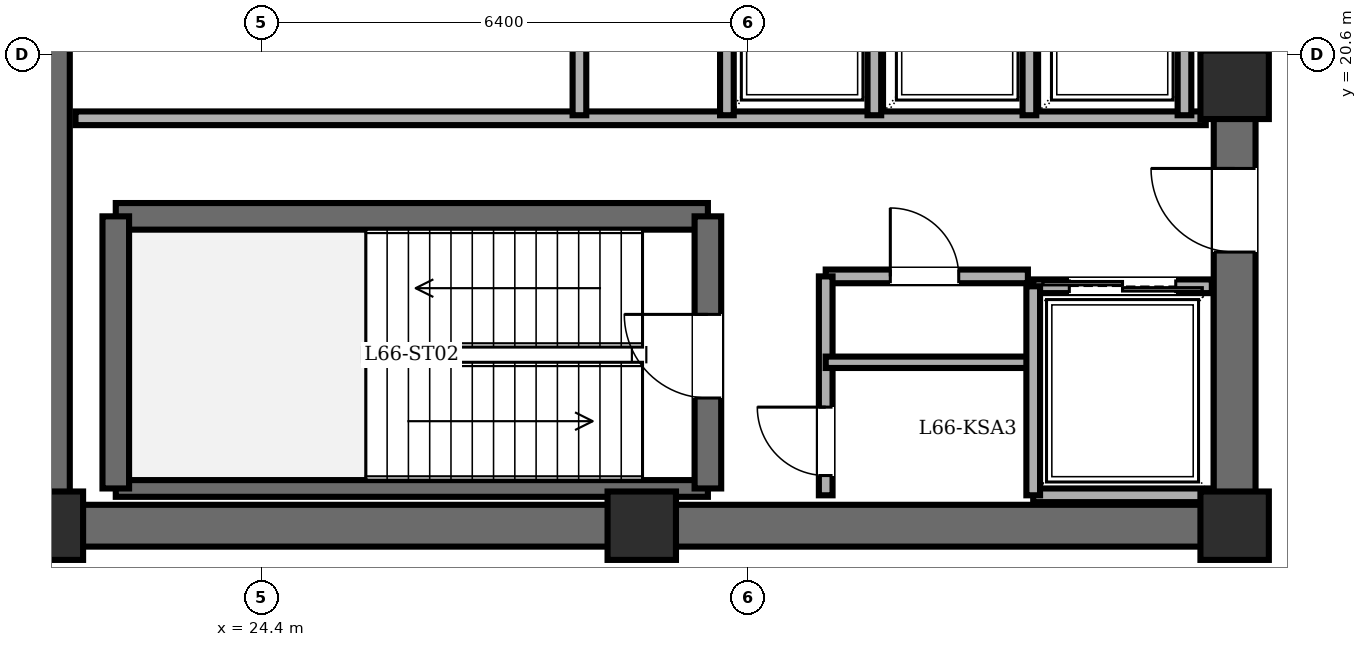
"""IFC4 building model, lengths in metres.
Left out: names, types, materials, properties, quantities, classifications, styles, units other than length and angle.
Written with IfcOpenShell. Run it as: python <this file> out.ifc"""

import sys

from ifc_helpers import new_model, si_unit, direction, frame, frame_2d, origin, origin_2d, place, context, subcontext, project, spatial, rectangle, extrude, element, fill, save


model = new_model("IFC4")
c1 = context("Model", 3, precision=1e-05, world=origin(), true_north=direction((0.0, 1.0)))
c2 = subcontext(c1, "Body", "Model", "MODEL_VIEW")
j1 = project(units=[si_unit("LENGTHUNIT", "METRE"), si_unit("PLANEANGLEUNIT", "RADIAN")], contexts=[c1])
p1 = place(None, origin())
s1 = spatial("IfcSite", under=j1, at=p1, CompositionType="ELEMENT")
p2 = place(p1, origin())
s2 = spatial("IfcBuilding", under=s1, at=p2, CompositionType="ELEMENT")
p3 = place(p2, frame((0.0, 0.0, 253.7)))
s3 = spatial("IfcBuildingStorey", under=s2, at=p3, CompositionType="ELEMENT", Elevation=253.7)
for number, where, z_axis, x_axis in (
    (1, (21.6, 14.4, 0.0), (0.0, 0.0, 1.0), (1.0, 0.0, 0.0)),
    (2, (29.4, 14.4, 0.0), (0.0, 0.0, 1.0), (1.0, 0.0, 0.0)),
    (3, (37.2, 14.4, 0.0), (0.0, 0.0, 1.0), (1.0, 0.0, 0.0)),
    (4, (37.2, 20.2, 0.0), (0.0, 0.0, 1.0), (1.0, 0.0, 0.0)),
):
    element("IfcColumn", number, at=place(p3, frame(where, z_axis=z_axis, x_axis=x_axis)), inside=s3, PredefinedType="COLUMN", context=c2, shape_type="SweptSolid", body=[
        extrude(rectangle(XDim=0.9, YDim=0.9, at=origin_2d()), origin(), (0.0, 0.0, 1.0), 5.1),
    ])
p4 = place(p3, frame((21.6, 14.4, 0.0), z_axis=(0.0, 0.0, 1.0), x_axis=(0.0, 1.0, 0.0)))
e5 = element("IfcWall", 5, at=p4, inside=s3, PredefinedType="SHEAR", context=c2, shape_type="SweptSolid", body=[
    extrude(rectangle(XDim=19.2, YDim=0.55, at=frame_2d((9.6, 0.0))), origin(), (0.0, 0.0, 1.0), 4.9),
])
p5 = place(p3, frame((37.2, 14.4, 0.0), z_axis=(0.0, 0.0, 1.0), x_axis=(-1.0, 0.0, 0.0)))
e6 = element("IfcWall", 6, at=p5, inside=s3, PredefinedType="SHEAR", context=c2, shape_type="SweptSolid", body=[
    extrude(rectangle(XDim=15.6, YDim=0.55, at=frame_2d((7.8, 0.0))), origin(), (0.0, 0.0, 1.0), 4.9),
])
p6 = place(p3, frame((37.2, 14.4, 0.0), z_axis=(0.0, 0.0, 1.0), x_axis=(0.0, 1.0, 0.0)))
e7 = element("IfcWall", 7, at=p6, inside=s3, PredefinedType="SHEAR", context=c2, shape_type="SweptSolid", body=[
    extrude(rectangle(XDim=19.2, YDim=0.55, at=frame_2d((9.6, 0.0))), origin(), (0.0, 0.0, 1.0), 4.9),
])
p7 = place(p6, frame((15.8, 0.0, 0.0)))
e8 = element("IfcOpeningElement", 8, at=p7, cuts=e7, PredefinedType="OPENING", context=c2, shape_type="SweptSolid", body=[
    extrude(rectangle(XDim=1.15, YDim=2.15, at=frame_2d((0.575, 1.075))), frame((0.0, 0.285, 0.0), z_axis=(0.0, -1.0, 0.0), x_axis=(1.0, 0.0, 0.0)), (0.0, 0.0, 1.0), 0.57),
])
p8 = place(p6, frame((3.6, 0.0, 0.0)))
e9 = element("IfcOpeningElement", 9, at=p8, cuts=e7, PredefinedType="OPENING", context=c2, shape_type="SweptSolid", body=[
    extrude(rectangle(XDim=1.1, YDim=2.15, at=frame_2d((0.55, 1.075))), frame((0.0, 0.285, 0.0), z_axis=(0.0, -1.0, 0.0), x_axis=(1.0, 0.0, 0.0)), (0.0, 0.0, 1.0), 0.57),
])
p9 = place(p6, frame((8.6, 0.0, 0.0)))
e10 = element("IfcOpeningElement", 10, at=p9, cuts=e7, PredefinedType="OPENING", context=c2, shape_type="SweptSolid", body=[
    extrude(rectangle(XDim=1.3, YDim=2.2, at=frame_2d((0.65, 1.1))), frame((0.0, 0.285, 0.0), z_axis=(0.0, -1.0, 0.0), x_axis=(1.0, 0.0, 0.0)), (0.0, 0.0, 1.0), 0.57),
])
p10 = place(p3, frame((22.48, 18.47, 0.0), z_axis=(0.0, 0.0, 1.0), x_axis=(1.0, 0.0, 0.0)))
e11 = element("IfcWall", 11, at=p10, inside=s3, PredefinedType="SOLIDWALL", context=c2, shape_type="SweptSolid", body=[
    extrude(rectangle(XDim=7.79, YDim=0.35, at=frame_2d((3.895, 0.0))), origin(), (0.0, 0.0, 1.0), 4.9),
])
p11 = place(p3, frame((22.48, 14.89, 0.0), z_axis=(0.0, 0.0, 1.0), x_axis=(1.0, 0.0, 0.0)))
e12 = element("IfcWall", 12, at=p11, inside=s3, PredefinedType="PARTITIONING", context=c2, shape_type="SweptSolid", body=[
    extrude(rectangle(XDim=7.79, YDim=0.22, at=frame_2d((3.895, 0.0))), origin(), (0.0, 0.0, 1.0), 4.9),
])
p12 = place(p3, frame((22.48, 14.89, 0.0), z_axis=(0.0, 0.0, 1.0), x_axis=(0.0, 1.0, 0.0)))
e13 = element("IfcWall", 13, at=p12, inside=s3, PredefinedType="SOLIDWALL", context=c2, shape_type="SweptSolid", body=[
    extrude(rectangle(XDim=3.58, YDim=0.35, at=frame_2d((1.79, 0.0))), origin(), (0.0, 0.0, 1.0), 4.9),
])
p13 = place(p3, frame((30.27, 14.89, 0.0), z_axis=(0.0, 0.0, 1.0), x_axis=(0.0, 1.0, 0.0)))
e14 = element("IfcWall", 14, at=p13, inside=s3, PredefinedType="SOLIDWALL", context=c2, shape_type="SweptSolid", body=[
    extrude(rectangle(XDim=3.58, YDim=0.35, at=frame_2d((1.79, 0.0))), origin(), (0.0, 0.0, 1.0), 4.9),
])
p14 = place(p13, frame((1.19, 0.0, 0.0)))
e15 = element("IfcOpeningElement", 15, at=p14, cuts=e14, PredefinedType="OPENING", context=c2, shape_type="SweptSolid", body=[
    extrude(rectangle(XDim=1.1, YDim=2.15, at=frame_2d((0.55, 1.075))), frame((0.0, 0.185, 0.0), z_axis=(0.0, -1.0, 0.0), x_axis=(1.0, 0.0, 0.0)), (0.0, 0.0, 1.0), 0.37),
])
p15 = place(p3, frame((21.95, 19.76, 0.0), z_axis=(0.0, 0.0, 1.0), x_axis=(1.0, 0.0, 0.0)))
e16 = element("IfcWall", 16, at=p15, inside=s3, PredefinedType="PARTITIONING", context=c2, shape_type="SweptSolid", body=[
    extrude(rectangle(XDim=14.87, YDim=0.18, at=frame_2d((7.435, 0.0))), origin(), (0.0, 0.0, 1.0), 4.9),
])
p16 = place(p3, frame((31.82, 17.68, 0.0), z_axis=(0.0, 0.0, 1.0), x_axis=(1.0, 0.0, 0.0)))
e17 = element("IfcWall", 17, at=p16, inside=s3, PredefinedType="PARTITIONING", context=c2, shape_type="SweptSolid", body=[
    extrude(rectangle(XDim=2.66, YDim=0.18, at=frame_2d((1.33, 0.0))), origin(), (0.0, 0.0, 1.0), 4.9),
])
p17 = place(p16, frame((0.85, 0.0, 0.0)))
e18 = element("IfcOpeningElement", 18, at=p17, cuts=e17, PredefinedType="OPENING", context=c2, shape_type="SweptSolid", body=[
    extrude(rectangle(XDim=0.9, YDim=2.05, at=frame_2d((0.45, 1.025))), frame((0.0, 0.1, 0.0), z_axis=(0.0, -1.0, 0.0), x_axis=(1.0, 0.0, 0.0)), (0.0, 0.0, 1.0), 0.2),
])
p18 = place(p3, frame((31.82, 14.8, 0.0), z_axis=(0.0, 0.0, 1.0), x_axis=(0.0, 1.0, 0.0)))
e19 = element("IfcWall", 19, at=p18, inside=s3, PredefinedType="PARTITIONING", context=c2, shape_type="SweptSolid", body=[
    extrude(rectangle(XDim=2.88, YDim=0.18, at=frame_2d((1.44, 0.0))), origin(), (0.0, 0.0, 1.0), 4.9),
])
p19 = place(p18, frame((0.26, 0.0, 0.0)))
e20 = element("IfcOpeningElement", 20, at=p19, cuts=e19, PredefinedType="OPENING", context=c2, shape_type="SweptSolid", body=[
    extrude(rectangle(XDim=0.9, YDim=2.05, at=frame_2d((0.45, 1.025))), frame((0.0, 0.1, 0.0), z_axis=(0.0, -1.0, 0.0), x_axis=(1.0, 0.0, 0.0)), (0.0, 0.0, 1.0), 0.2),
])
p20 = place(p3, frame((31.82, 16.55, 0.0), z_axis=(0.0, 0.0, 1.0), x_axis=(1.0, 0.0, 0.0)))
e21 = element("IfcWall", 21, at=p20, inside=s3, PredefinedType="PARTITIONING", context=c2, shape_type="SweptSolid", body=[
    extrude(rectangle(XDim=2.66, YDim=0.15, at=frame_2d((1.33, 0.0))), origin(), (0.0, 0.0, 1.0), 4.9),
])
p21 = place(p3, frame((34.55, 17.55, 0.0), z_axis=(0.0, 0.0, 1.0), x_axis=(1.0, 0.0, 0.0)))
e22 = element("IfcWall", 22, at=p21, inside=s3, PredefinedType="PARTITIONING", context=c2, shape_type="SweptSolid", body=[
    extrude(rectangle(XDim=2.35, YDim=0.18, at=frame_2d((1.175, 0.0))), origin(), (0.0, 0.0, 1.0), 4.9),
])
p22 = place(p21, frame((0.475, 0.0, 0.0)))
e23 = element("IfcOpeningElement", 23, at=p22, cuts=e22, PredefinedType="OPENING", context=c2, shape_type="SweptSolid", body=[
    extrude(rectangle(XDim=1.4, YDim=2.3, at=frame_2d((0.7, 1.15))), frame((0.0, 0.1, 0.0), z_axis=(0.0, -1.0, 0.0), x_axis=(1.0, 0.0, 0.0)), (0.0, 0.0, 1.0), 0.2),
])
p23 = place(p3, frame((36.9, 14.8, 0.0), z_axis=(0.0, 0.0, 1.0), x_axis=(-1.0, 0.0, 0.0)))
e24 = element("IfcWall", 24, at=p23, inside=s3, PredefinedType="PARTITIONING", context=c2, shape_type="SweptSolid", body=[
    extrude(rectangle(XDim=2.35, YDim=0.18, at=frame_2d((1.175, 0.0))), origin(), (0.0, 0.0, 1.0), 4.9),
])
p24 = place(p3, frame((34.55, 17.55, 0.0), z_axis=(0.0, 0.0, 1.0), x_axis=(0.0, -1.0, 0.0)))
e25 = element("IfcWall", 25, at=p24, inside=s3, PredefinedType="PARTITIONING", context=c2, shape_type="SweptSolid", body=[
    extrude(rectangle(XDim=2.75, YDim=0.18, at=frame_2d((1.375, 0.0))), origin(), (0.0, 0.0, 1.0), 4.9),
])
for number, where, z_axis, x_axis in (
    (26, (32.46, 19.8, 0.0), (0.0, 0.0, 1.0), (0.0, 1.0, 0.0)),
    (27, (34.5, 19.8, 0.0), (0.0, 0.0, 1.0), (0.0, 1.0, 0.0)),
    (28, (36.54, 19.8, 0.0), (0.0, 0.0, 1.0), (0.0, 1.0, 0.0)),
):
    element("IfcWall", number, at=place(p3, frame(where, z_axis=z_axis, x_axis=x_axis)), inside=s3, PredefinedType="PARTITIONING", context=c2, shape_type="SweptSolid", body=[
        extrude(rectangle(XDim=2.5, YDim=0.18, at=frame_2d((1.25, 0.0))), origin(), (0.0, 0.0, 1.0), 4.9),
    ])
p25 = place(p3, frame((30.52, 19.8, 0.0), z_axis=(0.0, 0.0, 1.0), x_axis=(0.0, 1.0, 0.0)))
e29 = element("IfcWall", 29, at=p25, inside=s3, PredefinedType="PARTITIONING", context=c2, shape_type="SweptSolid", body=[
    extrude(rectangle(XDim=2.55, YDim=0.18, at=frame_2d((1.275, 0.0))), origin(), (0.0, 0.0, 1.0), 4.9),
])
p26 = place(p3, frame((28.58, 19.8, 0.0), z_axis=(0.0, 0.0, 1.0), x_axis=(0.0, 1.0, 0.0)))
e30 = element("IfcWall", 30, at=p26, inside=s3, PredefinedType="PARTITIONING", context=c2, shape_type="SweptSolid", body=[
    extrude(rectangle(XDim=2.65, YDim=0.18, at=frame_2d((1.325, 0.0))), origin(), (0.0, 0.0, 1.0), 4.9),
])
p27 = place(p26, frame((0.865, 0.0, 0.0)))
e31 = element("IfcOpeningElement", 31, at=p27, cuts=e30, PredefinedType="OPENING", context=c2, shape_type="SweptSolid", body=[
    extrude(rectangle(XDim=0.92, YDim=2.1, at=frame_2d((0.46, 1.05))), frame((0.0, 0.1, 0.0), z_axis=(0.0, -1.0, 0.0), x_axis=(1.0, 0.0, 0.0)), (0.0, 0.0, 1.0), 0.2),
])
p28 = place(p14, origin())
e32 = element("IfcDoor", 32, at=p28, inside=s3, OperationType="SINGLE_SWING_RIGHT", PredefinedType="DOOR", context=c2, shape_type="SweptSolid", body=[
    extrude(rectangle(XDim=1.1, YDim=2.15, at=frame_2d((0.55, 1.075))), frame((0.0, 0.025, 0.0), z_axis=(0.0, -1.0, 0.0), x_axis=(1.0, 0.0, 0.0)), (0.0, 0.0, 1.0), 0.05),
])
fill(e15, e32)
p29 = place(p8, origin())
e33 = element("IfcDoor", 33, at=p29, inside=s3, OperationType="SINGLE_SWING_RIGHT", PredefinedType="DOOR", context=c2, shape_type="SweptSolid", body=[
    extrude(rectangle(XDim=1.1, YDim=2.15, at=frame_2d((0.55, 1.075))), frame((0.0, 0.025, 0.0), z_axis=(0.0, -1.0, 0.0), x_axis=(1.0, 0.0, 0.0)), (0.0, 0.0, 1.0), 0.05),
])
fill(e9, e33)
p30 = place(p17, origin())
e34 = element("IfcDoor", 34, at=p30, inside=s3, OperationType="SINGLE_SWING_LEFT", PredefinedType="DOOR", context=c2, shape_type="SweptSolid", body=[
    extrude(rectangle(XDim=0.9, YDim=2.05, at=frame_2d((0.45, 1.025))), frame((0.0, 0.025, 0.0), z_axis=(0.0, -1.0, 0.0), x_axis=(1.0, 0.0, 0.0)), (0.0, 0.0, 1.0), 0.05),
])
fill(e18, e34)
p31 = place(p19, origin())
e35 = element("IfcDoor", 35, at=p31, inside=s3, OperationType="SINGLE_SWING_RIGHT", PredefinedType="DOOR", context=c2, shape_type="SweptSolid", body=[
    extrude(rectangle(XDim=0.9, YDim=2.05, at=frame_2d((0.45, 1.025))), frame((0.0, 0.025, 0.0), z_axis=(0.0, -1.0, 0.0), x_axis=(1.0, 0.0, 0.0)), (0.0, 0.0, 1.0), 0.05),
])
fill(e20, e35)
p32 = place(p22, origin())
e36 = element("IfcDoor", 36, at=p32, inside=s3, OperationType="DOUBLE_DOOR_SLIDING", PredefinedType="DOOR", context=c2, shape_type="SweptSolid", body=[
    extrude(rectangle(XDim=1.4, YDim=2.3, at=frame_2d((0.7, 1.15))), frame((0.0, 0.025, 0.0), z_axis=(0.0, -1.0, 0.0), x_axis=(1.0, 0.0, 0.0)), (0.0, 0.0, 1.0), 0.05),
])
fill(e23, e36)
save(model, sys.argv[1])
